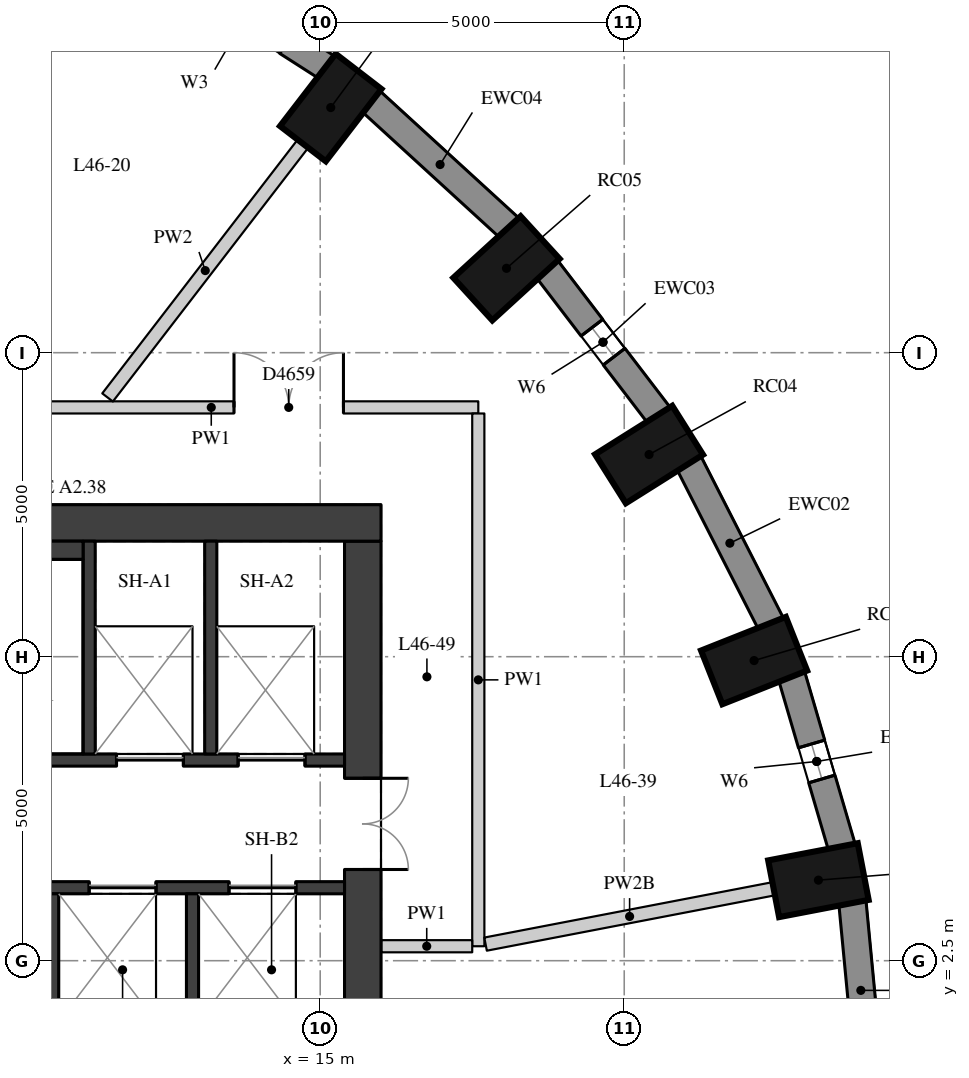
"""IFC4 building model, lengths in metres.
Left out: names, types, materials, properties, quantities, classifications, styles, units other than length and angle.
Written with IfcOpenShell. Run it as: python <this file> out.ifc"""

import sys

from ifc_helpers import new_model, si_unit, direction, frame, frame_2d, origin, origin_2d, place, context, subcontext, project, spatial, rectangle, extrude, element, fill, save


model = new_model("IFC4")
c1 = context("Model", 3, precision=1e-05, world=origin(), true_north=direction((0.0, 1.0)))
c2 = subcontext(c1, "Body", "Model", "MODEL_VIEW")
j1 = project(units=[si_unit("LENGTHUNIT", "METRE"), si_unit("PLANEANGLEUNIT", "RADIAN")], contexts=[c1])
p1 = place(None, origin())
s1 = spatial("IfcSite", under=j1, at=p1, CompositionType="ELEMENT")
p2 = place(p1, origin())
s2 = spatial("IfcBuilding", under=s1, at=p2, CompositionType="ELEMENT")
p3 = place(p2, frame((0.0, 0.0, 164.9)))
s3 = spatial("IfcBuildingStorey", under=s2, at=p3, CompositionType="ELEMENT", Elevation=164.9)
for number, where, z_axis, x_axis in (
    (1, (23.194, 3.825, 0.0), (0.0, 0.0, 1.0), (0.982, 0.189, 0.0)),
    (2, (22.136, 7.436, 0.0), (0.0, 0.0, 1.0), (0.93, 0.369, 0.0)),
    (3, (20.408, 10.825, 0.0), (0.0, 0.0, 1.0), (0.846, 0.533, 0.0)),
    (4, (18.064, 13.888, 0.0), (0.0, 0.0, 1.0), (0.738, 0.675, 0.0)),
    (5, (15.173, 16.532, 0.0), (0.0, 0.0, 1.0), (0.61, 0.792, 0.0)),
):
    element("IfcColumn", number, at=place(p3, frame(where, z_axis=z_axis, x_axis=x_axis)), inside=s3, PredefinedType="COLUMN", context=c2, shape_type="SweptSolid", body=[
        extrude(rectangle(XDim=1.5, YDim=0.95, at=origin_2d()), origin(), (0.0, 0.0, 1.0), 3.3),
    ])
p4 = place(p3, frame((24.031, 0.555, 0.0), z_axis=(0.0, 0.0, 1.0), x_axis=(-0.095265737322, 0.995451876935, 0.0)))
e6 = element("IfcWall", 6, at=p4, inside=s3, PredefinedType="SOLIDWALL", context=c2, shape_type="SweptSolid", body=[
    extrude(rectangle(XDim=2.927, YDim=0.45, at=frame_2d((1.463, 0.0))), origin(), (0.0, 0.0, 1.0), 3.02),
])
p5 = place(p3, frame((23.58, 4.362, 0.0), z_axis=(0.0, 0.0, 1.0), x_axis=(-0.281049481624, 0.959693278542, 0.0)))
e7 = element("IfcWall", 7, at=p5, inside=s3, PredefinedType="SOLIDWALL", context=c2, shape_type="SweptSolid", body=[
    extrude(rectangle(XDim=2.948, YDim=0.45, at=frame_2d((1.474, 0.0))), origin(), (0.0, 0.0, 1.0), 3.02),
])
p6 = place(p5, frame((1.174, 0.0, 0.4)))
e8 = element("IfcOpeningElement", 8, at=p6, cuts=e7, PredefinedType="OPENING", context=c2, shape_type="SweptSolid", body=[
    extrude(rectangle(XDim=0.6, YDim=1.75, at=frame_2d((0.3, 0.875))), frame((0.0, 0.235, 0.0), z_axis=(0.0, -1.0, 0.0), x_axis=(1.0, 0.0, 0.0)), (0.0, 0.0, 1.0), 0.47),
])
p7 = place(p3, frame((22.415, 8.037, 0.0), z_axis=(0.0, 0.0, 1.0), x_axis=(-0.454133999889, 0.890933392653, 0.0)))
e9 = element("IfcWall", 9, at=p7, inside=s3, PredefinedType="SOLIDWALL", context=c2, shape_type="SweptSolid", body=[
    extrude(rectangle(XDim=2.986, YDim=0.45, at=frame_2d((1.493, 0.0))), origin(), (0.0, 0.0, 1.0), 3.02),
])
p8 = place(p3, frame((20.574, 11.467, 0.0), z_axis=(0.0, 0.0, 1.0), x_axis=(-0.607817056371, 0.794077090706, 0.0)))
e10 = element("IfcWall", 10, at=p8, inside=s3, PredefinedType="SOLIDWALL", context=c2, shape_type="SweptSolid", body=[
    extrude(rectangle(XDim=3.037, YDim=0.45, at=frame_2d((1.519, 0.0))), origin(), (0.0, 0.0, 1.0), 3.02),
])
p9 = place(p8, frame((1.219, 0.0, 0.4)))
e11 = element("IfcOpeningElement", 11, at=p9, cuts=e10, PredefinedType="OPENING", context=c2, shape_type="SweptSolid", body=[
    extrude(rectangle(XDim=0.6, YDim=1.75, at=frame_2d((0.3, 0.875))), frame((0.0, 0.235, 0.0), z_axis=(0.0, -1.0, 0.0), x_axis=(1.0, 0.0, 0.0)), (0.0, 0.0, 1.0), 0.47),
])
p10 = place(p3, frame((18.113, 14.55, 0.0), z_axis=(0.0, 0.0, 1.0), x_axis=(-0.737808755941, 0.675009807082, 0.0)))
e12 = element("IfcWall", 12, at=p10, inside=s3, PredefinedType="SOLIDWALL", context=c2, shape_type="SweptSolid", body=[
    extrude(rectangle(XDim=3.094, YDim=0.45, at=frame_2d((1.547, 0.0))), origin(), (0.0, 0.0, 1.0), 3.02),
])
p11 = place(p3, frame((15.108, 17.193, 0.0), z_axis=(0.0, 0.0, 1.0), x_axis=(-0.842030726237, 0.539429565442, 0.0)))
e13 = element("IfcWall", 13, at=p11, inside=s3, PredefinedType="SOLIDWALL", context=c2, shape_type="SweptSolid", body=[
    extrude(rectangle(XDim=3.151, YDim=0.45, at=frame_2d((1.576, 0.0))), origin(), (0.0, 0.0, 1.0), 3.02),
])
p12 = place(p11, frame((0.776, 0.0, 0.4)))
e14 = element("IfcOpeningElement", 14, at=p12, cuts=e13, PredefinedType="OPENING", context=c2, shape_type="SweptSolid", body=[
    extrude(rectangle(XDim=1.6, YDim=1.75, at=frame_2d((0.8, 0.875))), frame((0.0, 0.235, 0.0), z_axis=(0.0, -1.0, 0.0), x_axis=(1.0, 0.0, 0.0)), (0.0, 0.0, 1.0), 0.47),
])
p13 = place(p3, frame((15.7, -9.4, 0.0), z_axis=(0.0, 0.0, 1.0), x_axis=(0.0, 1.0, 0.0)))
e15 = element("IfcWall", 15, at=p13, inside=s3, PredefinedType="SHEAR", context=c2, shape_type="SweptSolid", body=[
    extrude(rectangle(XDim=18.8, YDim=0.6, at=frame_2d((9.4, 0.0))), origin(), (0.0, 0.0, 1.0), 3.02),
])
p14 = place(p13, frame((13.4, 0.0, 0.0)))
e16 = element("IfcOpeningElement", 16, at=p14, cuts=e15, PredefinedType="OPENING", context=c2, shape_type="SweptSolid", body=[
    extrude(rectangle(XDim=1.5, YDim=2.1, at=frame_2d((0.75, 1.05))), frame((0.0, 0.31, 0.0), z_axis=(0.0, -1.0, 0.0), x_axis=(1.0, 0.0, 0.0)), (0.0, 0.0, 1.0), 0.62),
])
p15 = place(p13, frame((3.9, 0.0, 0.0)))
e17 = element("IfcOpeningElement", 17, at=p15, cuts=e15, PredefinedType="OPENING", context=c2, shape_type="SweptSolid", body=[
    extrude(rectangle(XDim=1.5, YDim=2.1, at=frame_2d((0.75, 1.05))), frame((0.0, 0.31, 0.0), z_axis=(0.0, -1.0, 0.0), x_axis=(1.0, 0.0, 0.0)), (0.0, 0.0, 1.0), 0.62),
])
p16 = place(p3, frame((4.0, 9.7, 0.0), z_axis=(0.0, 0.0, 1.0), x_axis=(1.0, 0.0, 0.0)))
e18 = element("IfcWall", 18, at=p16, inside=s3, PredefinedType="SHEAR", context=c2, shape_type="SweptSolid", body=[
    extrude(rectangle(XDim=12.0, YDim=0.6, at=frame_2d((6.0, 0.0))), origin(), (0.0, 0.0, 1.0), 3.02),
])
p17 = place(p3, frame((4.6, 5.8, 0.0), z_axis=(0.0, 0.0, 1.0), x_axis=(1.0, 0.0, 0.0)))
e19 = element("IfcWall", 19, at=p17, inside=s3, PredefinedType="SHEAR", context=c2, shape_type="SweptSolid", body=[
    extrude(rectangle(XDim=10.8, YDim=0.2, at=frame_2d((5.4, 0.0))), origin(), (0.0, 0.0, 1.0), 3.02),
])
p18 = place(p17, frame((7.05, 0.0, 0.0)))
e20 = element("IfcOpeningElement", 20, at=p18, cuts=e19, PredefinedType="OPENING", context=c2, shape_type="SweptSolid", body=[
    extrude(rectangle(XDim=1.1, YDim=2.1, at=frame_2d((0.55, 1.05))), frame((0.0, 0.11, 0.0), z_axis=(0.0, -1.0, 0.0), x_axis=(1.0, 0.0, 0.0)), (0.0, 0.0, 1.0), 0.22),
])
p19 = place(p17, frame((9.05, 0.0, 0.0)))
e21 = element("IfcOpeningElement", 21, at=p19, cuts=e19, PredefinedType="OPENING", context=c2, shape_type="SweptSolid", body=[
    extrude(rectangle(XDim=1.1, YDim=2.1, at=frame_2d((0.55, 1.05))), frame((0.0, 0.11, 0.0), z_axis=(0.0, -1.0, 0.0), x_axis=(1.0, 0.0, 0.0)), (0.0, 0.0, 1.0), 0.22),
])
p20 = place(p3, frame((4.6, 3.7, 0.0), z_axis=(0.0, 0.0, 1.0), x_axis=(1.0, 0.0, 0.0)))
e22 = element("IfcWall", 22, at=p20, inside=s3, PredefinedType="SHEAR", context=c2, shape_type="SweptSolid", body=[
    extrude(rectangle(XDim=10.8, YDim=0.2, at=frame_2d((5.4, 0.0))), origin(), (0.0, 0.0, 1.0), 3.02),
])
p21 = place(p20, frame((6.6, 0.0, 0.0)))
e23 = element("IfcOpeningElement", 23, at=p21, cuts=e22, PredefinedType="OPENING", context=c2, shape_type="SweptSolid", body=[
    extrude(rectangle(XDim=1.1, YDim=2.1, at=frame_2d((0.55, 1.05))), frame((0.0, 0.11, 0.0), z_axis=(0.0, -1.0, 0.0), x_axis=(1.0, 0.0, 0.0)), (0.0, 0.0, 1.0), 0.22),
])
p22 = place(p20, frame((8.9, 0.0, 0.0)))
e24 = element("IfcOpeningElement", 24, at=p22, cuts=e22, PredefinedType="OPENING", context=c2, shape_type="SweptSolid", body=[
    extrude(rectangle(XDim=1.1, YDim=2.1, at=frame_2d((0.55, 1.05))), frame((0.0, 0.11, 0.0), z_axis=(0.0, -1.0, 0.0), x_axis=(1.0, 0.0, 0.0)), (0.0, 0.0, 1.0), 0.22),
])
for number, where, z_axis, x_axis in (
    (25, (11.2, 5.9, 0.0), (0.0, 0.0, 1.0), (0.0, 1.0, 0.0)),
    (26, (13.2, 5.9, 0.0), (0.0, 0.0, 1.0), (0.0, 1.0, 0.0)),
):
    element("IfcWall", number, at=place(p3, frame(where, z_axis=z_axis, x_axis=x_axis)), inside=s3, PredefinedType="SHEAR", context=c2, shape_type="SweptSolid", body=[
        extrude(rectangle(XDim=3.5, YDim=0.2, at=frame_2d((1.75, 0.0))), origin(), (0.0, 0.0, 1.0), 3.02),
    ])
for number, where, z_axis, x_axis in (
    (27, (10.6, 1.1, 0.0), (0.0, 0.0, 1.0), (0.0, 1.0, 0.0)),
    (28, (12.9, 1.1, 0.0), (0.0, 0.0, 1.0), (0.0, 1.0, 0.0)),
):
    element("IfcWall", number, at=place(p3, frame(where, z_axis=z_axis, x_axis=x_axis)), inside=s3, PredefinedType="SHEAR", context=c2, shape_type="SweptSolid", body=[
        extrude(rectangle(XDim=2.5, YDim=0.2, at=frame_2d((1.25, 0.0))), origin(), (0.0, 0.0, 1.0), 3.02),
    ])
p23 = place(p3, frame((6.22, 9.25, 0.0), z_axis=(0.0, 0.0, 1.0), x_axis=(1.0, 0.0, 0.0)))
e29 = element("IfcWall", 29, at=p23, inside=s3, PredefinedType="PARTITIONING", context=c2, shape_type="SweptSolid", body=[
    extrude(rectangle(XDim=4.88, YDim=0.3, at=frame_2d((2.44, 0.0))), origin(), (0.0, 0.0, 1.0), 3.02),
])
p24 = place(p3, frame((8.817, 11.6, 0.0), z_axis=(0.0, 0.0, 1.0), x_axis=(1.0, 0.0, 0.0)))
e30 = element("IfcWall", 30, at=p24, inside=s3, PredefinedType="PARTITIONING", context=c2, shape_type="SweptSolid", body=[
    extrude(rectangle(XDim=8.783, YDim=0.2, at=frame_2d((4.392, 0.0))), origin(), (0.0, 0.0, 1.0), 3.02),
])
p25 = place(p24, frame((0.14, 0.0, 0.0)))
e31 = element("IfcOpeningElement", 31, at=p25, cuts=e30, PredefinedType="OPENING", context=c2, shape_type="SweptSolid", body=[
    extrude(rectangle(XDim=1.1, YDim=2.1, at=frame_2d((0.55, 1.05))), frame((0.0, 0.11, 0.0), z_axis=(0.0, -1.0, 0.0), x_axis=(1.0, 0.0, 0.0)), (0.0, 0.0, 1.0), 0.22),
])
p26 = place(p24, frame((4.766, 0.0, 0.0)))
e32 = element("IfcOpeningElement", 32, at=p26, cuts=e30, PredefinedType="OPENING", context=c2, shape_type="SweptSolid", body=[
    extrude(rectangle(XDim=1.8, YDim=2.1, at=frame_2d((0.9, 1.05))), frame((0.0, 0.11, 0.0), z_axis=(0.0, -1.0, 0.0), x_axis=(1.0, 0.0, 0.0)), (0.0, 0.0, 1.0), 0.22),
])
p27 = place(p3, frame((17.6, 11.5, 0.0), z_axis=(0.0, 0.0, 1.0), x_axis=(0.0, -1.0, 0.0)))
e33 = element("IfcWall", 33, at=p27, inside=s3, PredefinedType="PARTITIONING", context=c2, shape_type="SweptSolid", body=[
    extrude(rectangle(XDim=8.762, YDim=0.2, at=frame_2d((4.381, 0.0))), origin(), (0.0, 0.0, 1.0), 3.02),
])
p28 = place(p3, frame((17.5, 2.738, 0.0), z_axis=(0.0, 0.0, 1.0), x_axis=(-1.0, 0.0, 0.0)))
e34 = element("IfcWall", 34, at=p28, inside=s3, PredefinedType="PARTITIONING", context=c2, shape_type="SweptSolid", body=[
    extrude(rectangle(XDim=1.496, YDim=0.2, at=frame_2d((0.748, 0.0))), origin(), (0.0, 0.0, 1.0), 3.02),
])
p29 = place(p3, frame((22.457, 3.683, 0.0), z_axis=(0.0, 0.0, 1.0), x_axis=(-0.982022686577, -0.188762928159, 0.0)))
e35 = element("IfcWall", 35, at=p29, inside=s3, PredefinedType="PARTITIONING", context=c2, shape_type="SweptSolid", body=[
    extrude(rectangle(XDim=4.824, YDim=0.22, at=frame_2d((2.412, 0.0))), origin(), (0.0, 0.0, 1.0), 2.57),
])
p30 = place(p3, frame((14.716, 15.937, 0.0), z_axis=(0.0, 0.0, 1.0), x_axis=(-0.61000193202, -0.792399926131, 0.0)))
e36 = element("IfcWall", 36, at=p30, inside=s3, PredefinedType="PARTITIONING", context=c2, shape_type="SweptSolid", body=[
    extrude(rectangle(XDim=5.267, YDim=0.22, at=frame_2d((2.634, 0.0))), origin(), (0.0, 0.0, 1.0), 3.02),
])
p31 = place(p6, origin())
e37 = element("IfcWindow", 37, at=p31, inside=s3, PartitioningType="SINGLE_PANEL", PredefinedType="WINDOW", context=c2, shape_type="SweptSolid", body=[
    extrude(rectangle(XDim=0.6, YDim=1.75, at=frame_2d((0.3, 0.875))), frame((0.0, 0.035, 0.0), z_axis=(0.0, -1.0, 0.0), x_axis=(1.0, 0.0, 0.0)), (0.0, 0.0, 1.0), 0.06),
])
fill(e8, e37)
p32 = place(p9, origin())
e38 = element("IfcWindow", 38, at=p32, inside=s3, PartitioningType="SINGLE_PANEL", PredefinedType="WINDOW", context=c2, shape_type="SweptSolid", body=[
    extrude(rectangle(XDim=0.6, YDim=1.75, at=frame_2d((0.3, 0.875))), frame((0.0, 0.035, 0.0), z_axis=(0.0, -1.0, 0.0), x_axis=(1.0, 0.0, 0.0)), (0.0, 0.0, 1.0), 0.06),
])
fill(e11, e38)
p33 = place(p14, origin())
e39 = element("IfcDoor", 39, at=p33, inside=s3, OperationType="DOUBLE_DOOR_SINGLE_SWING", PredefinedType="DOOR", context=c2, shape_type="SweptSolid", body=[
    extrude(rectangle(XDim=1.5, YDim=2.1, at=frame_2d((0.75, 1.05))), frame((0.0, 0.025, 0.0), z_axis=(0.0, -1.0, 0.0), x_axis=(1.0, 0.0, 0.0)), (0.0, 0.0, 1.0), 0.05),
])
fill(e16, e39)
p34 = place(p18, origin())
e40 = element("IfcDoor", 40, at=p34, inside=s3, OperationType="DOUBLE_DOOR_SLIDING", PredefinedType="DOOR", context=c2, shape_type="SweptSolid", body=[
    extrude(rectangle(XDim=1.1, YDim=2.1, at=frame_2d((0.55, 1.05))), frame((0.0, 0.025, 0.0), z_axis=(0.0, -1.0, 0.0), x_axis=(1.0, 0.0, 0.0)), (0.0, 0.0, 1.0), 0.05),
])
fill(e20, e40)
p35 = place(p19, origin())
e41 = element("IfcDoor", 41, at=p35, inside=s3, OperationType="DOUBLE_DOOR_SLIDING", PredefinedType="DOOR", context=c2, shape_type="SweptSolid", body=[
    extrude(rectangle(XDim=1.1, YDim=2.1, at=frame_2d((0.55, 1.05))), frame((0.0, 0.025, 0.0), z_axis=(0.0, -1.0, 0.0), x_axis=(1.0, 0.0, 0.0)), (0.0, 0.0, 1.0), 0.05),
])
fill(e21, e41)
p36 = place(p21, origin())
e42 = element("IfcDoor", 42, at=p36, inside=s3, OperationType="DOUBLE_DOOR_SLIDING", PredefinedType="DOOR", context=c2, shape_type="SweptSolid", body=[
    extrude(rectangle(XDim=1.1, YDim=2.1, at=frame_2d((0.55, 1.05))), frame((0.0, 0.025, 0.0), z_axis=(0.0, -1.0, 0.0), x_axis=(1.0, 0.0, 0.0)), (0.0, 0.0, 1.0), 0.05),
])
fill(e23, e42)
p37 = place(p22, origin())
e43 = element("IfcDoor", 43, at=p37, inside=s3, OperationType="DOUBLE_DOOR_SLIDING", PredefinedType="DOOR", context=c2, shape_type="SweptSolid", body=[
    extrude(rectangle(XDim=1.1, YDim=2.1, at=frame_2d((0.55, 1.05))), frame((0.0, 0.025, 0.0), z_axis=(0.0, -1.0, 0.0), x_axis=(1.0, 0.0, 0.0)), (0.0, 0.0, 1.0), 0.05),
])
fill(e24, e43)
p38 = place(p26, origin())
e44 = element("IfcDoor", 44, at=p38, inside=s3, OperationType="DOUBLE_DOOR_SINGLE_SWING", PredefinedType="DOOR", context=c2, shape_type="SweptSolid", body=[
    extrude(rectangle(XDim=1.8, YDim=2.1, at=frame_2d((0.9, 1.05))), frame((0.0, 0.025, 0.0), z_axis=(0.0, -1.0, 0.0), x_axis=(1.0, 0.0, 0.0)), (0.0, 0.0, 1.0), 0.05),
])
fill(e32, e44)
save(model, sys.argv[1])
